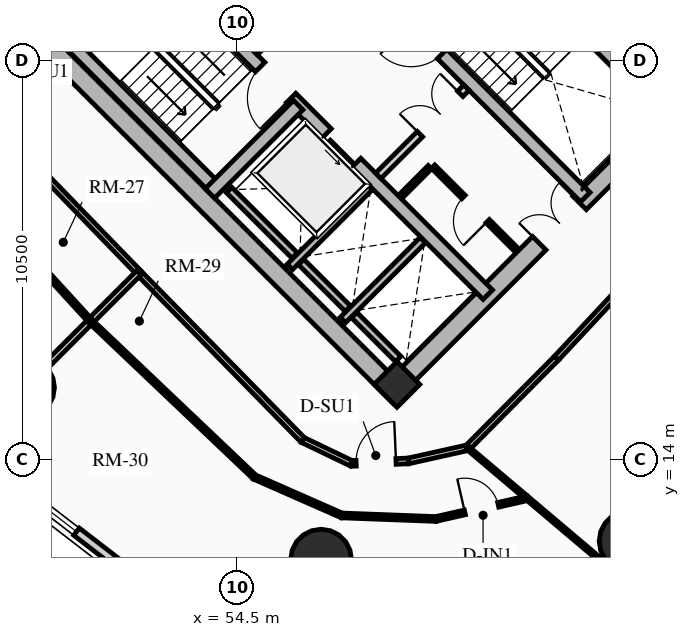
"""IFC4 building model, lengths in metres.
Left out: names, types, materials, properties, quantities, classifications, styles, units other than length and angle.
Written with IfcOpenShell. Run it as: python <this file> out.ifc"""

import sys

from ifc_helpers import new_model, si_unit, direction, frame, frame_2d, origin, origin_2d, place, context, subcontext, project, spatial, rectangle, circle, extrude, source, transform, mapped, element, fill, save


model = new_model("IFC4")
c1 = context("Model", 3, precision=1e-05, world=origin(), true_north=direction((0.0, 1.0)))
c2 = subcontext(c1, "Body", "Model", "MODEL_VIEW")
j1 = project(units=[si_unit("LENGTHUNIT", "METRE"), si_unit("PLANEANGLEUNIT", "RADIAN")], contexts=[c1])
p1 = place(None, origin())
s1 = spatial("IfcSite", under=j1, at=p1, CompositionType="ELEMENT")
p2 = place(p1, origin())
s2 = spatial("IfcBuilding", under=s1, at=p2, CompositionType="ELEMENT")
p3 = place(p2, frame((0.0, 0.0, 27.82)))
s3 = spatial("IfcBuildingStorey", under=s2, at=p3, CompositionType="ELEMENT", Elevation=27.82)
for number, where, z_axis, x_axis in (
    (1, (58.773, 15.661, 0.0), (0.0, 0.0, 1.0), (-0.707, 0.707, 0.0)),
    (2, (66.339, 23.227, 0.0), (0.0, 0.0, 1.0), (-0.707, 0.707, 0.0)),
):
    element("IfcWall", number, at=place(p3, frame(where, z_axis=z_axis, x_axis=x_axis)), inside=s3, PredefinedType="SHEAR", context=c2, shape_type="SweptSolid", body=[
        extrude(rectangle(XDim=14.3, YDim=0.5, at=frame_2d((7.15, 0.0))), origin(), (0.0, 0.0, 1.0), 2.91),
    ])
p4 = place(p3, frame((58.596, 15.838, 0.0), z_axis=(0.0, 0.0, 1.0), x_axis=(0.707106781187, 0.707106781187, 0.0)))
e3 = element("IfcWall", 3, at=p4, inside=s3, PredefinedType="SHEAR", context=c2, shape_type="SweptSolid", body=[
    extrude(rectangle(XDim=10.7, YDim=0.5, at=frame_2d((5.35, 0.0))), origin(), (0.0, 0.0, 1.0), 2.91),
])
m1 = source(origin(), c2, "Body", "SweptSolid", [
    extrude(rectangle(XDim=1.5, YDim=2.02, at=frame_2d((0.75, 1.01))), frame((0.0, 0.26, 0.0), z_axis=(0.0, -1.0, 0.0), x_axis=(1.0, 0.0, 0.0)), (0.0, 0.0, 1.0), 0.52),
])
p5 = place(p4, frame((5.45, 0.0, 0.0)))
e4 = element("IfcOpeningElement", 4, at=p5, cuts=e3, PredefinedType="OPENING", context=c2, shape_type="MappedRepresentation", body=[
    mapped(m1, transform((0.0, 0.0, 0.0), x_axis=(1.0, 0.0, 0.0), y_axis=(0.0, 1.0, 0.0), z_axis=(0.0, 0.0, 1.0), scale=1.0)),
])
p6 = place(p3, frame((61.096, 18.338, 0.0), z_axis=(0.0, 0.0, 1.0), x_axis=(-0.707106781187, 0.707106781187, 0.0)))
e5 = element("IfcWall", 5, at=p6, inside=s3, PredefinedType="SHEAR", context=c2, shape_type="SweptSolid", body=[
    extrude(rectangle(XDim=13.8, YDim=0.35, at=frame_2d((6.9, 0.0))), origin(), (0.0, 0.0, 1.0), 2.91),
])
m2 = source(origin(), c2, "Body", "SweptSolid", [
    extrude(rectangle(XDim=1.1, YDim=2.015, at=frame_2d((0.55, 1.007))), frame((0.0, 0.185, 0.0), z_axis=(0.0, -1.0, 0.0), x_axis=(1.0, 0.0, 0.0)), (0.0, 0.0, 1.0), 0.37),
])
p7 = place(p6, frame((4.9, 0.0, 0.0)))
e6 = element("IfcOpeningElement", 6, at=p7, cuts=e5, PredefinedType="OPENING", context=c2, shape_type="MappedRepresentation", body=[
    mapped(m2, transform((0.0, 0.0, 0.0), x_axis=(1.0, 0.0, 0.0), y_axis=(0.0, 1.0, 0.0), z_axis=(0.0, 0.0, 1.0), scale=1.0)),
])
m3 = source(origin(), c2, "Body", "SweptSolid", [
    extrude(rectangle(XDim=1.15, YDim=2.02, at=frame_2d((0.575, 1.01))), frame((0.0, 0.185, 0.0), z_axis=(0.0, -1.0, 0.0), x_axis=(1.0, 0.0, 0.0)), (0.0, 0.0, 1.0), 0.37),
])
p8 = place(p6, frame((7.32, 0.0, 0.0)))
e7 = element("IfcOpeningElement", 7, at=p8, cuts=e5, PredefinedType="OPENING", context=c2, shape_type="MappedRepresentation", body=[
    mapped(m3, transform((0.0, 0.0, 0.0), x_axis=(1.0, 0.0, 0.0), y_axis=(0.0, 1.0, 0.0), z_axis=(0.0, 0.0, 1.0), scale=1.0)),
])
p9 = place(p3, frame((63.662, 20.904, 0.0), z_axis=(0.0, 0.0, 1.0), x_axis=(-0.707106781187, 0.707106781187, 0.0)))
e8 = element("IfcWall", 8, at=p9, inside=s3, PredefinedType="SHEAR", context=c2, shape_type="SweptSolid", body=[
    extrude(rectangle(XDim=13.8, YDim=0.35, at=frame_2d((6.9, 0.0))), origin(), (0.0, 0.0, 1.0), 2.91),
])
p10 = place(p9, frame((10.025, 0.0, 0.0)))
e9 = element("IfcOpeningElement", 9, at=p10, cuts=e8, PredefinedType="OPENING", context=c2, shape_type="MappedRepresentation", body=[
    mapped(m2, transform((0.0, 0.0, 0.0), x_axis=(1.0, 0.0, 0.0), y_axis=(0.0, 1.0, 0.0), z_axis=(0.0, 0.0, 1.0), scale=1.0)),
])
p11 = place(p9, frame((12.025, 0.0, 0.0)))
e10 = element("IfcOpeningElement", 10, at=p11, cuts=e8, PredefinedType="OPENING", context=c2, shape_type="MappedRepresentation", body=[
    mapped(m2, transform((0.0, 0.0, 0.0), x_axis=(1.0, 0.0, 0.0), y_axis=(0.0, 1.0, 0.0), z_axis=(0.0, 0.0, 1.0), scale=1.0)),
])
p12 = place(p9, frame((5.33, 0.0, 0.0)))
e11 = element("IfcOpeningElement", 11, at=p12, cuts=e8, PredefinedType="OPENING", context=c2, shape_type="MappedRepresentation", body=[
    mapped(m3, transform((0.0, 0.0, 0.0), x_axis=(1.0, 0.0, 0.0), y_axis=(0.0, 1.0, 0.0), z_axis=(0.0, 0.0, 1.0), scale=1.0)),
])
p13 = place(p3, frame((53.922, 21.141, 0.0), z_axis=(0.0, 0.0, 1.0), x_axis=(-0.707106781187, 0.707106781187, 0.0)))
e12 = element("IfcWall", 12, at=p13, inside=s3, PredefinedType="SHEAR", context=c2, shape_type="SweptSolid", body=[
    extrude(rectangle(XDim=6.745, YDim=0.35, at=frame_2d((3.373, 0.0))), origin(), (0.0, 0.0, 1.0), 2.91),
])
p14 = place(p3, frame((53.784, 21.003, 0.0), z_axis=(0.0, 0.0, 1.0), x_axis=(0.707106781187, 0.707106781187, 0.0)))
e13 = element("IfcWall", 13, at=p14, inside=s3, PredefinedType="SHEAR", context=c2, shape_type="SweptSolid", body=[
    extrude(rectangle(XDim=3.285, YDim=0.35, at=frame_2d((1.643, 0.0))), origin(), (0.0, 0.0, 1.0), 2.91),
])
p15 = place(p3, frame((65.847, 23.089, 0.0), z_axis=(0.0, 0.0, 1.0), x_axis=(-0.707106781187, 0.707106781187, 0.0)))
e14 = element("IfcWall", 14, at=p15, inside=s3, PredefinedType="SHEAR", context=c2, shape_type="SweptSolid", body=[
    extrude(rectangle(XDim=6.745, YDim=0.35, at=frame_2d((3.373, 0.0))), origin(), (0.0, 0.0, 1.0), 2.91),
])
p16 = place(p3, frame((58.706, 15.976, 0.0), z_axis=(0.0, 0.0, 1.0), x_axis=(0.707106781187, 0.707106781187, 0.0)))
e15 = element("IfcColumn", 15, at=p16, inside=s3, PredefinedType="COLUMN", context=c2, shape_type="SweptSolid", body=[
    extrude(rectangle(XDim=0.85, YDim=0.85, at=origin_2d()), origin(), (0.0, 0.0, 1.0), 2.91),
])
for number, where, z_axis, x_axis in (
    (16, (48.893, 15.893, 0.0), (0.0, 0.0, 1.0), (1.0, 0.0, 0.0)),
    (17, (56.709, 11.365, 0.0), (0.0, 0.0, 1.0), (1.0, 0.0, 0.0)),
    (18, (64.827, 11.854, 0.0), (0.0, 0.0, 1.0), (1.0, 0.0, 0.0)),
):
    element("IfcColumn", number, at=place(p3, frame(where, z_axis=z_axis, x_axis=x_axis)), inside=s3, PredefinedType="USERDEFINED", context=c2, shape_type="SweptSolid", body=[
        extrude(circle(Radius=0.8, at=origin_2d()), origin(), (0.0, 0.0, 1.0), 2.91),
    ])
p17 = place(p3, frame((51.688, 11.01, 0.0), z_axis=(0.0, 0.0, 1.0), x_axis=(-0.791972010801, 0.610557396243, 0.0)))
e19 = element("IfcWall", 19, at=p17, inside=s3, PredefinedType="SOLIDWALL", context=c2, shape_type="SweptSolid", body=[
    extrude(rectangle(XDim=5.475, YDim=0.24, at=frame_2d((2.737, 0.0))), origin(), (0.0, 0.0, 1.0), 2.073),
])
m4 = source(origin(), c2, "Body", "SweptSolid", [
    extrude(rectangle(XDim=1.9, YDim=1.35, at=frame_2d((0.95, 0.675))), frame((0.0, 0.13, 0.0), z_axis=(0.0, -1.0, 0.0), x_axis=(1.0, 0.0, 0.0)), (0.0, 0.0, 1.0), 0.26),
])
p18 = place(p17, frame((1.787, 0.0, 0.65)))
e20 = element("IfcOpeningElement", 20, at=p18, cuts=e19, PredefinedType="OPENING", context=c2, shape_type="MappedRepresentation", body=[
    mapped(m4, transform((0.0, 0.0, 0.0), x_axis=(1.0, 0.0, 0.0), y_axis=(0.0, 1.0, 0.0), z_axis=(0.0, 0.0, 1.0), scale=1.0)),
])
p19 = place(p3, frame((55.888, 19.069, 0.0), z_axis=(0.0, 0.0, 1.0), x_axis=(0.707106781187, 0.707106781187, 0.0)))
e21 = element("IfcWall", 21, at=p19, inside=s3, PredefinedType="SHEAR", context=c2, shape_type="SweptSolid", body=[
    extrude(rectangle(XDim=2.97, YDim=0.2, at=frame_2d((1.485, 0.0))), origin(), (0.0, 0.0, 1.0), 2.91),
])
p20 = place(p3, frame((56.015, 19.366, 0.0), z_axis=(0.0, 0.0, 1.0), x_axis=(-0.707106781187, 0.707106781187, 0.0)))
e22 = element("IfcWall", 22, at=p20, inside=s3, PredefinedType="SHEAR", context=c2, shape_type="SweptSolid", body=[
    extrude(rectangle(XDim=2.44, YDim=0.2, at=frame_2d((1.22, 0.0))), origin(), (0.0, 0.0, 1.0), 2.91),
])
p21 = place(p3, frame((57.284, 17.673, 0.0), z_axis=(0.0, 0.0, 1.0), x_axis=(0.707147878904, 0.70706568108, 0.0)))
e23 = element("IfcWall", 23, at=p21, inside=s3, PredefinedType="SHEAR", context=c2, shape_type="SweptSolid", body=[
    extrude(rectangle(XDim=2.97, YDim=0.2, at=frame_2d((1.485, 0.0))), origin(), (0.0, 0.0, 1.0), 2.91),
])
p22 = place(p3, frame((57.412, 17.97, 0.0), z_axis=(0.0, 0.0, 1.0), x_axis=(-0.707106781187, 0.707106781187, 0.0)))
e24 = element("IfcWall", 24, at=p22, inside=s3, PredefinedType="SHEAR", context=c2, shape_type="SweptSolid", body=[
    extrude(rectangle(XDim=1.735, YDim=0.2, at=frame_2d((0.867, 0.0))), origin(), (0.0, 0.0, 1.0), 2.91),
])
p23 = place(p3, frame((58.737, 16.644, 0.0), z_axis=(0.0, 0.0, 1.0), x_axis=(-0.707032117043, 0.707181437447, 0.0)))
e25 = element("IfcWall", 25, at=p23, inside=s3, PredefinedType="SHEAR", context=c2, shape_type="SweptSolid", body=[
    extrude(rectangle(XDim=1.635, YDim=0.2, at=frame_2d((0.817, 0.0))), origin(), (0.0, 0.0, 1.0), 2.91),
])
p24 = place(p3, frame((58.214, 21.467, 0.0), z_axis=(0.0, 0.0, 1.0), x_axis=(0.707106781187, 0.707106781187, 0.0)))
e26 = element("IfcWall", 26, at=p24, inside=s3, PredefinedType="PARTITIONING", context=c2, shape_type="SweptSolid", body=[
    extrude(rectangle(XDim=3.28, YDim=0.2, at=frame_2d((1.64, 0.0))), origin(), (0.0, 0.0, 1.0), 2.635),
])
m5 = source(origin(), c2, "Body", "SweptSolid", [
    extrude(rectangle(XDim=1.5, YDim=2.02, at=frame_2d((0.75, 1.01))), frame((0.0, 0.11, 0.0), z_axis=(0.0, -1.0, 0.0), x_axis=(1.0, 0.0, 0.0)), (0.0, 0.0, 1.0), 0.22),
])
p25 = place(p24, frame((1.55, 0.0, 0.0)))
e27 = element("IfcOpeningElement", 27, at=p25, cuts=e26, PredefinedType="OPENING", context=c2, shape_type="MappedRepresentation", body=[
    mapped(m5, transform((0.0, 0.0, 0.0), x_axis=(1.0, 0.0, 0.0), y_axis=(0.0, 1.0, 0.0), z_axis=(0.0, 0.0, 1.0), scale=1.0)),
])
p26 = place(p3, frame((54.961, 24.719, 0.0), z_axis=(0.0, 0.0, 1.0), x_axis=(0.707106781187, 0.707106781187, 0.0)))
e28 = element("IfcWall", 28, at=p26, inside=s3, PredefinedType="PARTITIONING", context=c2, shape_type="SweptSolid", body=[
    extrude(rectangle(XDim=3.28, YDim=0.2, at=frame_2d((1.64, 0.0))), origin(), (0.0, 0.0, 1.0), 2.635),
])
m6 = source(origin(), c2, "Body", "SweptSolid", [
    extrude(rectangle(XDim=0.9, YDim=2.005, at=frame_2d((0.45, 1.002))), frame((0.0, 0.11, 0.0), z_axis=(0.0, -1.0, 0.0), x_axis=(1.0, 0.0, 0.0)), (0.0, 0.0, 1.0), 0.22),
])
p27 = place(p26, frame((0.16, 0.0, 0.0)))
e29 = element("IfcOpeningElement", 29, at=p27, cuts=e28, PredefinedType="OPENING", context=c2, shape_type="MappedRepresentation", body=[
    mapped(m6, transform((0.0, 0.0, 0.0), x_axis=(1.0, 0.0, 0.0), y_axis=(0.0, 1.0, 0.0), z_axis=(0.0, 0.0, 1.0), scale=1.0)),
])
p28 = place(p3, frame((61.835, 19.529, 0.0), z_axis=(0.0, 0.0, 1.0), x_axis=(-0.707146413884, 0.707067146267, 0.0)))
e30 = element("IfcWall", 30, at=p28, inside=s3, PredefinedType="PARTITIONING", context=c2, shape_type="SweptSolid", body=[
    extrude(rectangle(XDim=3.08, YDim=0.125, at=frame_2d((1.54, 0.0))), origin(), (0.0, 0.0, 1.0), 2.635),
])
m7 = source(origin(), c2, "Body", "SweptSolid", [
    extrude(rectangle(XDim=0.9, YDim=2.005, at=frame_2d((0.45, 1.002))), frame((0.0, 0.073, 0.0), z_axis=(0.0, -1.0, 0.0), x_axis=(1.0, 0.0, 0.0)), (0.0, 0.0, 1.0), 0.145),
])
p29 = place(p28, frame((1.05, 0.0, 0.0)))
e31 = element("IfcOpeningElement", 31, at=p29, cuts=e30, PredefinedType="OPENING", context=c2, shape_type="MappedRepresentation", body=[
    mapped(m7, transform((0.0, 0.0, 0.0), x_axis=(1.0, 0.0, 0.0), y_axis=(0.0, 1.0, 0.0), z_axis=(0.0, 0.0, 1.0), scale=1.0)),
])
p30 = place(p3, frame((58.794, 20.915, 0.0), z_axis=(0.0, 0.0, 1.0), x_axis=(0.707106781187, 0.707106781187, 0.0)))
e32 = element("IfcWall", 32, at=p30, inside=s3, PredefinedType="PARTITIONING", context=c2, shape_type="SweptSolid", body=[
    extrude(rectangle(XDim=1.1, YDim=0.125, at=frame_2d((0.55, 0.0))), origin(), (0.0, 0.0, 1.0), 2.635),
])
p31 = place(p3, frame((47.706, 23.253, 0.0), z_axis=(0.0, 0.0, 1.0), x_axis=(0.696179266346, -0.717867974707, 0.0)))
e33 = element("IfcWall", 33, at=p31, inside=s3, PredefinedType="PARTITIONING", context=c2, shape_type="SweptSolid", body=[
    extrude(rectangle(XDim=6.045, YDim=0.15, at=frame_2d((3.022, 0.0))), origin(), (0.0, 0.0, 1.0), 2.635),
])
p32 = place(p3, frame((51.914, 18.914, 0.0), z_axis=(0.0, 0.0, 1.0), x_axis=(0.699999313799, -0.714143515465, 0.0)))
e34 = element("IfcWall", 34, at=p32, inside=s3, PredefinedType="PARTITIONING", context=c2, shape_type="SweptSolid", body=[
    extrude(rectangle(XDim=6.162, YDim=0.15, at=frame_2d((3.081, 0.0))), origin(), (0.0, 0.0, 1.0), 2.159),
])
p33 = place(p3, frame((56.227, 14.513, 0.0), z_axis=(0.0, 0.0, 1.0), x_axis=(0.901477579283, -0.432825801044, 0.0)))
e35 = element("IfcWall", 35, at=p33, inside=s3, PredefinedType="PARTITIONING", context=c2, shape_type="SweptSolid", body=[
    extrude(rectangle(XDim=1.424, YDim=0.15, at=frame_2d((0.712, 0.0))), origin(), (0.0, 0.0, 1.0), 2.205),
])
p34 = place(p3, frame((57.511, 13.897, 0.0), z_axis=(0.0, 0.0, 1.0), x_axis=(0.999024538494, 0.044158481476, 0.0)))
e36 = element("IfcWall", 36, at=p34, inside=s3, PredefinedType="PARTITIONING", context=c2, shape_type="SweptSolid", body=[
    extrude(rectangle(XDim=1.498, YDim=0.15, at=frame_2d((0.749, 0.0))), origin(), (0.0, 0.0, 1.0), 2.159),
])
m8 = source(origin(), c2, "Body", "SweptSolid", [
    extrude(rectangle(XDim=1.05, YDim=2.015, at=frame_2d((0.525, 1.007))), frame((0.0, 0.085, 0.0), z_axis=(0.0, -1.0, 0.0), x_axis=(1.0, 0.0, 0.0)), (0.0, 0.0, 1.0), 0.17),
])
p35 = place(p34, frame((0.12, 0.0, 0.0)))
e37 = element("IfcOpeningElement", 37, at=p35, cuts=e36, PredefinedType="OPENING", context=c2, shape_type="MappedRepresentation", body=[
    mapped(m8, transform((0.0, 0.0, 0.0), x_axis=(1.0, 0.0, 0.0), y_axis=(0.0, 1.0, 0.0), z_axis=(0.0, 0.0, 1.0), scale=1.0)),
])
p36 = place(p3, frame((59.008, 13.963, 0.0), z_axis=(0.0, 0.0, 1.0), x_axis=(0.976020856791, 0.21767702476, 0.0)))
e38 = element("IfcWall", 38, at=p36, inside=s3, PredefinedType="PARTITIONING", context=c2, shape_type="SweptSolid", body=[
    extrude(rectangle(XDim=1.593, YDim=0.15, at=frame_2d((0.796, 0.0))), origin(), (0.0, 0.0, 1.0), 2.205),
])
p37 = place(p3, frame((60.562, 14.31, 0.0), z_axis=(0.0, 0.0, 1.0), x_axis=(0.704566236161, 0.709638230975, 0.0)))
e39 = element("IfcWall", 39, at=p37, inside=s3, PredefinedType="PARTITIONING", context=c2, shape_type="SweptSolid", body=[
    extrude(rectangle(XDim=3.321, YDim=0.15, at=frame_2d((1.661, 0.0))), origin(), (0.0, 0.0, 1.0), 2.159),
])
p38 = place(p3, frame((62.903, 16.667, 0.0), z_axis=(0.0, 0.0, 1.0), x_axis=(0.682371947497, 0.731005147225, 0.0)))
e40 = element("IfcWall", 40, at=p38, inside=s3, PredefinedType="PARTITIONING", context=c2, shape_type="SweptSolid", body=[
    extrude(rectangle(XDim=6.642, YDim=0.15, at=frame_2d((3.321, 0.0))), origin(), (0.0, 0.0, 1.0), 2.159),
])
p39 = place(p3, frame((51.914, 18.914, 0.0), z_axis=(0.0, 0.0, 1.0), x_axis=(-0.707106781187, -0.707106781187, 0.0)))
e41 = element("IfcWall", 41, at=p39, inside=s3, PredefinedType="PARTITIONING", context=c2, shape_type="SweptSolid", body=[
    extrude(rectangle(XDim=6.431, YDim=0.16, at=frame_2d((3.215, 0.0))), origin(), (0.0, 0.0, 1.0), 2.073),
])
p40 = place(p3, frame((60.562, 14.31, 0.0), z_axis=(0.0, 0.0, 1.0), x_axis=(0.763547638675, -0.645751502881, 0.0)))
e42 = element("IfcWall", 42, at=p40, inside=s3, PredefinedType="MOVABLE", context=c2, shape_type="SweptSolid", body=[
    extrude(rectangle(XDim=7.345, YDim=0.1, at=frame_2d((3.673, 0.0))), origin(), (0.0, 0.0, 1.0), 2.073),
])
p41 = place(p3, frame((46.676, 21.978, 0.0), z_axis=(0.0, 0.0, 1.0), x_axis=(0.67473816271, -0.738057187339, 0.0)))
e43 = element("IfcWall", 43, at=p41, inside=s3, PredefinedType="PARTITIONING", context=c2, shape_type="SweptSolid", body=[
    extrude(rectangle(XDim=5.876, YDim=0.125, at=frame_2d((2.938, 0.0))), origin(), (0.0, 0.0, 1.0), 2.635),
])
p42 = place(p3, frame((50.641, 17.641, 0.0), z_axis=(0.0, 0.0, 1.0), x_axis=(0.724909383019, -0.688844239586, 0.0)))
e44 = element("IfcWall", 44, at=p42, inside=s3, PredefinedType="PARTITIONING", context=c2, shape_type="SweptSolid", body=[
    extrude(rectangle(XDim=5.957, YDim=0.125, at=frame_2d((2.979, 0.0))), origin(), (0.0, 0.0, 1.0), 2.159),
])
p43 = place(p3, frame((54.959, 13.537, 0.0), z_axis=(0.0, 0.0, 1.0), x_axis=(0.915414044123, -0.402513512596, 0.0)))
e45 = element("IfcWall", 45, at=p43, inside=s3, PredefinedType="PARTITIONING", context=c2, shape_type="SweptSolid", body=[
    extrude(rectangle(XDim=2.508, YDim=0.125, at=frame_2d((1.254, 0.0))), origin(), (0.0, 0.0, 1.0), 2.159),
])
p44 = place(p3, frame((57.255, 12.528, 0.0), z_axis=(0.0, 0.0, 1.0), x_axis=(0.999290303909, -0.037668136579, 0.0)))
e46 = element("IfcWall", 46, at=p44, inside=s3, PredefinedType="PARTITIONING", context=c2, shape_type="SweptSolid", body=[
    extrude(rectangle(XDim=2.476, YDim=0.125, at=frame_2d((1.238, 0.0))), origin(), (0.0, 0.0, 1.0), 2.159),
])
p45 = place(p3, frame((59.729, 12.434, 0.0), z_axis=(0.0, 0.0, 1.0), x_axis=(0.975062765266, 0.221929276555, 0.0)))
e47 = element("IfcWall", 47, at=p45, inside=s3, PredefinedType="PARTITIONING", context=c2, shape_type="SweptSolid", body=[
    extrude(rectangle(XDim=2.465, YDim=0.125, at=frame_2d((1.233, 0.0))), origin(), (0.0, 0.0, 1.0), 2.205),
])
p46 = place(p45, frame((0.783, 0.0, 0.0)))
e48 = element("IfcOpeningElement", 48, at=p46, cuts=e47, PredefinedType="OPENING", context=c2, shape_type="MappedRepresentation", body=[
    mapped(m7, transform((0.0, 0.0, 0.0), x_axis=(1.0, 0.0, 0.0), y_axis=(0.0, 1.0, 0.0), z_axis=(0.0, 0.0, 1.0), scale=1.0)),
])
m9 = source(origin(), c2, "Body", "SweptSolid", [
    extrude(rectangle(XDim=1.9, YDim=1.35, at=frame_2d((0.95, 0.675))), frame((0.0, 0.03, 0.0), z_axis=(0.0, -1.0, 0.0), x_axis=(1.0, 0.0, 0.0)), (0.0, 0.0, 1.0), 0.06),
])
p47 = place(p18, origin())
e49 = element("IfcWindow", 49, at=p47, inside=s3, PartitioningType="DOUBLE_PANEL_VERTICAL", PredefinedType="WINDOW", context=c2, shape_type="MappedRepresentation", body=[
    mapped(m9, transform((0.0, 0.0, 0.0), x_axis=(1.0, 0.0, 0.0), y_axis=(0.0, 1.0, 0.0), z_axis=(0.0, 0.0, 1.0), scale=1.0)),
])
fill(e20, e49)
m10 = source(origin(), c2, "Body", "SweptSolid", [
    extrude(rectangle(XDim=1.1, YDim=2.015, at=frame_2d((0.55, 1.007))), frame((0.0, 0.025, 0.0), z_axis=(0.0, -1.0, 0.0), x_axis=(1.0, 0.0, 0.0)), (0.0, 0.0, 1.0), 0.05),
])
p48 = place(p7, origin())
e50 = element("IfcDoor", 50, at=p48, inside=s3, OperationType="SLIDING_TO_LEFT", PredefinedType="DOOR", context=c2, shape_type="MappedRepresentation", body=[
    mapped(m10, transform((0.0, 0.0, 0.0), x_axis=(1.0, 0.0, 0.0), y_axis=(0.0, 1.0, 0.0), z_axis=(0.0, 0.0, 1.0), scale=1.0)),
])
fill(e6, e50)
m11 = source(origin(), c2, "Body", "SweptSolid", [
    extrude(rectangle(XDim=1.15, YDim=2.02, at=frame_2d((0.575, 1.01))), frame((0.0, 0.025, 0.0), z_axis=(0.0, -1.0, 0.0), x_axis=(1.0, 0.0, 0.0)), (0.0, 0.0, 1.0), 0.05),
])
p49 = place(p8, origin())
e51 = element("IfcDoor", 51, at=p49, inside=s3, OperationType="SINGLE_SWING_LEFT", PredefinedType="DOOR", context=c2, shape_type="MappedRepresentation", body=[
    mapped(m11, transform((0.0, 0.0, 0.0), x_axis=(1.0, 0.0, 0.0), y_axis=(0.0, 1.0, 0.0), z_axis=(0.0, 0.0, 1.0), scale=1.0)),
])
fill(e7, e51)
p50 = place(p12, origin())
e52 = element("IfcDoor", 52, at=p50, inside=s3, OperationType="SINGLE_SWING_RIGHT", PredefinedType="DOOR", context=c2, shape_type="MappedRepresentation", body=[
    mapped(m11, transform((0.0, 0.0, 0.0), x_axis=(1.0, 0.0, 0.0), y_axis=(0.0, 1.0, 0.0), z_axis=(0.0, 0.0, 1.0), scale=1.0)),
])
fill(e11, e52)
m12 = source(origin(), c2, "Body", "SweptSolid", [
    extrude(rectangle(XDim=1.5, YDim=2.02, at=frame_2d((0.75, 1.01))), frame((0.0, 0.025, 0.0), z_axis=(0.0, -1.0, 0.0), x_axis=(1.0, 0.0, 0.0)), (0.0, 0.0, 1.0), 0.05),
])
p51 = place(p5, origin())
e53 = element("IfcDoor", 53, at=p51, inside=s3, OperationType="DOUBLE_DOOR_SINGLE_SWING", PredefinedType="DOOR", context=c2, shape_type="MappedRepresentation", body=[
    mapped(m12, transform((0.0, 0.0, 0.0), x_axis=(1.0, 0.0, 0.0), y_axis=(0.0, 1.0, 0.0), z_axis=(0.0, 0.0, 1.0), scale=1.0)),
])
fill(e4, e53)
p52 = place(p25, origin())
e54 = element("IfcDoor", 54, at=p52, inside=s3, OperationType="DOUBLE_DOOR_SINGLE_SWING", PredefinedType="DOOR", context=c2, shape_type="MappedRepresentation", body=[
    mapped(m12, transform((0.0, 0.0, 0.0), x_axis=(1.0, 0.0, 0.0), y_axis=(0.0, 1.0, 0.0), z_axis=(0.0, 0.0, 1.0), scale=1.0)),
])
fill(e27, e54)
m13 = source(origin(), c2, "Body", "SweptSolid", [
    extrude(rectangle(XDim=0.9, YDim=2.005, at=frame_2d((0.45, 1.002))), frame((0.0, 0.025, 0.0), z_axis=(0.0, -1.0, 0.0), x_axis=(1.0, 0.0, 0.0)), (0.0, 0.0, 1.0), 0.05),
])
p53 = place(p29, origin())
e55 = element("IfcDoor", 55, at=p53, inside=s3, OperationType="SINGLE_SWING_LEFT", PredefinedType="DOOR", context=c2, shape_type="MappedRepresentation", body=[
    mapped(m13, transform((0.0, 0.0, 0.0), x_axis=(1.0, 0.0, 0.0), y_axis=(0.0, 1.0, 0.0), z_axis=(0.0, 0.0, 1.0), scale=1.0)),
])
fill(e31, e55)
m14 = source(origin(), c2, "Body", "SweptSolid", [
    extrude(rectangle(XDim=1.05, YDim=2.015, at=frame_2d((0.525, 1.007))), frame((0.0, 0.025, 0.0), z_axis=(0.0, -1.0, 0.0), x_axis=(1.0, 0.0, 0.0)), (0.0, 0.0, 1.0), 0.05),
])
p54 = place(p35, origin())
e56 = element("IfcDoor", 56, at=p54, inside=s3, OperationType="SINGLE_SWING_RIGHT", PredefinedType="DOOR", context=c2, shape_type="MappedRepresentation", body=[
    mapped(m14, transform((0.0, 0.0, 0.0), x_axis=(1.0, 0.0, 0.0), y_axis=(0.0, 1.0, 0.0), z_axis=(0.0, 0.0, 1.0), scale=1.0)),
])
fill(e37, e56)
p55 = place(p46, origin())
e57 = element("IfcDoor", 57, at=p55, inside=s3, OperationType="SINGLE_SWING_LEFT", PredefinedType="DOOR", context=c2, shape_type="MappedRepresentation", body=[
    mapped(m13, transform((0.0, 0.0, 0.0), x_axis=(1.0, 0.0, 0.0), y_axis=(0.0, 1.0, 0.0), z_axis=(0.0, 0.0, 1.0), scale=1.0)),
])
fill(e48, e57)
save(model, sys.argv[1])
